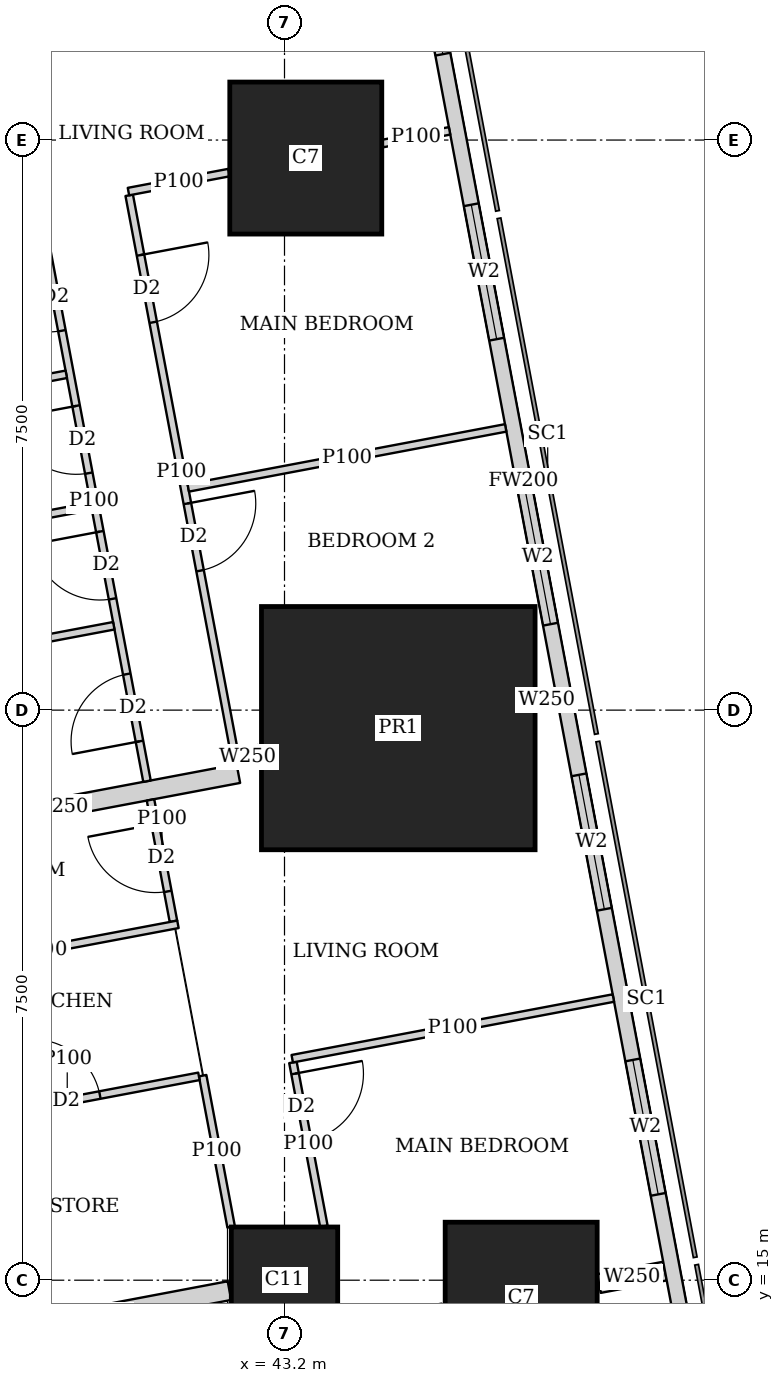
"""IFC4 building model, lengths in metres.
Left out: names, types, materials, properties, quantities, classifications, styles, units other than length and angle.
Written with IfcOpenShell. Run it as: python <this file> out.ifc"""

import sys

from ifc_helpers import new_model, si_unit, direction, frame, frame_2d, origin, origin_2d, place, context, subcontext, project, spatial, rectangle, extrude, element, fill, save


model = new_model("IFC4")
c1 = context("Model", 3, precision=1e-05, world=origin(), true_north=direction((0.0, 1.0)))
c2 = subcontext(c1, "Body", "Model", "MODEL_VIEW")
j1 = project(units=[si_unit("LENGTHUNIT", "METRE"), si_unit("PLANEANGLEUNIT", "RADIAN")], contexts=[c1])
p1 = place(None, origin())
s1 = spatial("IfcSite", under=j1, at=p1, CompositionType="ELEMENT")
p2 = place(p1, origin())
s2 = spatial("IfcBuilding", under=s1, at=p2, CompositionType="ELEMENT")
p3 = place(p2, frame((0.0, 0.0, 259.1)))
s3 = spatial("IfcBuildingStorey", under=s2, at=p3, CompositionType="ELEMENT", Elevation=259.1)
p4 = place(p3, frame((43.2, 15.0, 0.0), z_axis=(0.0, 0.0, 1.0), x_axis=(1.0, 0.0, 0.0)))
e1 = element("IfcColumn", 1, at=p4, inside=s3, PredefinedType="COLUMN", context=c2, shape_type="SweptSolid", body=[
    extrude(rectangle(XDim=1.4, YDim=1.4, at=origin_2d()), origin(), (0.0, 0.0, 1.0), 3.75),
])
p5 = place(p3, frame((46.314, 14.763, 0.0), z_axis=(0.0, 0.0, 1.0), x_axis=(1.0, 0.0, 0.0)))
e2 = element("IfcColumn", 2, at=p5, inside=s3, PredefinedType="COLUMN", context=c2, shape_type="SweptSolid", body=[
    extrude(rectangle(XDim=2.0, YDim=2.0, at=origin_2d()), origin(), (0.0, 0.0, 1.0), 3.75),
])
p6 = place(p3, frame((44.697, 22.263, 0.0), z_axis=(0.0, 0.0, 1.0), x_axis=(1.0, 0.0, 0.0)))
e3 = element("IfcColumn", 3, at=p6, inside=s3, PredefinedType="COLUMN", context=c2, shape_type="SweptSolid", body=[
    extrude(rectangle(XDim=3.6, YDim=3.2, at=origin_2d()), origin(), (0.0, 0.0, 1.0), 3.75),
])
p7 = place(p3, frame((43.48, 29.763, 0.0), z_axis=(0.0, 0.0, 1.0), x_axis=(1.0, 0.0, 0.0)))
e4 = element("IfcColumn", 4, at=p7, inside=s3, PredefinedType="COLUMN", context=c2, shape_type="SweptSolid", body=[
    extrude(rectangle(XDim=2.0, YDim=2.0, at=origin_2d()), origin(), (0.0, 0.0, 1.0), 3.75),
])
p8 = place(p3, frame((49.684, 7.832, 0.0), z_axis=(0.0, 0.0, 1.0), x_axis=(-0.185616669694, 0.982622232565, 0.0)))
e5 = element("IfcWall", 5, at=p8, inside=s3, PredefinedType="SOLIDWALL", context=c2, shape_type="SweptSolid", body=[
    extrude(rectangle(XDim=36.0, YDim=0.2, at=frame_2d((18.0, 0.0))), origin(), (0.0, 0.0, 1.0), 3.5),
])
p9 = place(p8, frame((2.518, 0.0, 0.9)))
e6 = element("IfcOpeningElement", 6, at=p9, cuts=e5, PredefinedType="OPENING", context=c2, shape_type="SweptSolid", body=[
    extrude(rectangle(XDim=2.4, YDim=1.5, at=frame_2d((1.2, 0.75))), frame((0.0, 0.11, 0.0), z_axis=(0.0, -1.0, 0.0), x_axis=(1.0, 0.0, 0.0)), (0.0, 0.0, 1.0), 0.22),
])
p10 = place(p8, frame((8.444, 0.0, 0.9)))
e7 = element("IfcOpeningElement", 7, at=p10, cuts=e5, PredefinedType="OPENING", context=c2, shape_type="SweptSolid", body=[
    extrude(rectangle(XDim=1.8, YDim=1.5, at=frame_2d((0.9, 0.75))), frame((0.0, 0.11, 0.0), z_axis=(0.0, -1.0, 0.0), x_axis=(1.0, 0.0, 0.0)), (0.0, 0.0, 1.0), 0.22),
])
p11 = place(p8, frame((12.261, 0.0, 0.9)))
e8 = element("IfcOpeningElement", 8, at=p11, cuts=e5, PredefinedType="OPENING", context=c2, shape_type="SweptSolid", body=[
    extrude(rectangle(XDim=1.8, YDim=1.5, at=frame_2d((0.9, 0.75))), frame((0.0, 0.11, 0.0), z_axis=(0.0, -1.0, 0.0), x_axis=(1.0, 0.0, 0.0)), (0.0, 0.0, 1.0), 0.22),
])
p12 = place(p8, frame((16.078, 0.0, 0.9)))
e9 = element("IfcOpeningElement", 9, at=p12, cuts=e5, PredefinedType="OPENING", context=c2, shape_type="SweptSolid", body=[
    extrude(rectangle(XDim=1.8, YDim=1.5, at=frame_2d((0.9, 0.75))), frame((0.0, 0.11, 0.0), z_axis=(0.0, -1.0, 0.0), x_axis=(1.0, 0.0, 0.0)), (0.0, 0.0, 1.0), 0.22),
])
p13 = place(p8, frame((19.894, 0.0, 0.9)))
e10 = element("IfcOpeningElement", 10, at=p13, cuts=e5, PredefinedType="OPENING", context=c2, shape_type="SweptSolid", body=[
    extrude(rectangle(XDim=1.8, YDim=1.5, at=frame_2d((0.9, 0.75))), frame((0.0, 0.11, 0.0), z_axis=(0.0, -1.0, 0.0), x_axis=(1.0, 0.0, 0.0)), (0.0, 0.0, 1.0), 0.22),
])
p14 = place(p8, frame((23.71, 0.0, 0.9)))
e11 = element("IfcOpeningElement", 11, at=p14, cuts=e5, PredefinedType="OPENING", context=c2, shape_type="SweptSolid", body=[
    extrude(rectangle(XDim=1.8, YDim=1.5, at=frame_2d((0.9, 0.75))), frame((0.0, 0.11, 0.0), z_axis=(0.0, -1.0, 0.0), x_axis=(1.0, 0.0, 0.0)), (0.0, 0.0, 1.0), 0.22),
])
p15 = place(p8, frame((27.526, 0.0, 0.9)))
e12 = element("IfcOpeningElement", 12, at=p15, cuts=e5, PredefinedType="OPENING", context=c2, shape_type="SweptSolid", body=[
    extrude(rectangle(XDim=1.8, YDim=1.5, at=frame_2d((0.9, 0.75))), frame((0.0, 0.11, 0.0), z_axis=(0.0, -1.0, 0.0), x_axis=(1.0, 0.0, 0.0)), (0.0, 0.0, 1.0), 0.22),
])
p16 = place(p8, frame((32.046, 0.0, 0.9)))
e13 = element("IfcOpeningElement", 13, at=p16, cuts=e5, PredefinedType="OPENING", context=c2, shape_type="SweptSolid", body=[
    extrude(rectangle(XDim=1.8, YDim=1.5, at=frame_2d((0.9, 0.75))), frame((0.0, 0.11, 0.0), z_axis=(0.0, -1.0, 0.0), x_axis=(1.0, 0.0, 0.0)), (0.0, 0.0, 1.0), 0.22),
])
p17 = place(p3, frame((33.781, 42.186, 0.0), z_axis=(0.0, 0.0, 1.0), x_axis=(0.185593518645, -0.9826266055, 0.0)))
e14 = element("IfcWall", 14, at=p17, inside=s3, PredefinedType="SOLIDWALL", context=c2, shape_type="SweptSolid", body=[
    extrude(rectangle(XDim=35.961, YDim=0.15, at=frame_2d((17.98, 0.0))), origin(), (0.0, 0.0, 1.0), 2.5),
])
p18 = place(p17, frame((7.183, 0.0, 0.0)))
e15 = element("IfcOpeningElement", 15, at=p18, cuts=e14, PredefinedType="OPENING", context=c2, shape_type="SweptSolid", body=[
    extrude(rectangle(XDim=1.0, YDim=2.1, at=frame_2d((0.5, 1.05))), frame((0.0, 0.085, 0.0), z_axis=(0.0, -1.0, 0.0), x_axis=(1.0, 0.0, 0.0)), (0.0, 0.0, 1.0), 0.17),
])
p19 = place(p17, frame((11.76, 0.0, 0.0)))
e16 = element("IfcOpeningElement", 16, at=p19, cuts=e14, PredefinedType="OPENING", context=c2, shape_type="SweptSolid", body=[
    extrude(rectangle(XDim=1.0, YDim=2.1, at=frame_2d((0.5, 1.05))), frame((0.0, 0.085, 0.0), z_axis=(0.0, -1.0, 0.0), x_axis=(1.0, 0.0, 0.0)), (0.0, 0.0, 1.0), 0.17),
])
p20 = place(p17, frame((23.863, 0.0, 0.0)))
e17 = element("IfcOpeningElement", 17, at=p20, cuts=e14, PredefinedType="OPENING", context=c2, shape_type="SweptSolid", body=[
    extrude(rectangle(XDim=1.0, YDim=2.1, at=frame_2d((0.5, 1.05))), frame((0.0, 0.085, 0.0), z_axis=(0.0, -1.0, 0.0), x_axis=(1.0, 0.0, 0.0)), (0.0, 0.0, 1.0), 0.17),
])
p21 = place(p17, frame((30.502, 0.0, 0.0)))
e18 = element("IfcOpeningElement", 18, at=p21, cuts=e14, PredefinedType="OPENING", context=c2, shape_type="SweptSolid", body=[
    extrude(rectangle(XDim=1.0, YDim=2.1, at=frame_2d((0.5, 1.05))), frame((0.0, 0.085, 0.0), z_axis=(0.0, -1.0, 0.0), x_axis=(1.0, 0.0, 0.0)), (0.0, 0.0, 1.0), 0.17),
])
p22 = place(p3, frame((41.157, 29.273, 0.0), z_axis=(0.0, 0.0, 1.0), x_axis=(0.18542464283, -0.982658486877, 0.0)))
e19 = element("IfcWall", 19, at=p22, inside=s3, PredefinedType="PARTITIONING", context=c2, shape_type="SweptSolid", body=[
    extrude(rectangle(XDim=7.421, YDim=0.1, at=frame_2d((3.71, 0.0))), origin(), (0.0, 0.0, 1.0), 2.5),
])
p23 = place(p22, frame((0.8, 0.0, 0.0)))
e20 = element("IfcOpeningElement", 20, at=p23, cuts=e19, PredefinedType="OPENING", context=c2, shape_type="SweptSolid", body=[
    extrude(rectangle(XDim=0.9, YDim=2.1, at=frame_2d((0.45, 1.05))), frame((0.0, 0.06, 0.0), z_axis=(0.0, -1.0, 0.0), x_axis=(1.0, 0.0, 0.0)), (0.0, 0.0, 1.0), 0.12),
])
p24 = place(p22, frame((4.126, 0.0, 0.0)))
e21 = element("IfcOpeningElement", 21, at=p24, cuts=e19, PredefinedType="OPENING", context=c2, shape_type="SweptSolid", body=[
    extrude(rectangle(XDim=0.9, YDim=2.1, at=frame_2d((0.45, 1.05))), frame((0.0, 0.06, 0.0), z_axis=(0.0, -1.0, 0.0), x_axis=(1.0, 0.0, 0.0)), (0.0, 0.0, 1.0), 0.12),
])
p25 = place(p3, frame((39.997, 28.942, 0.0), z_axis=(0.0, 0.0, 1.0), x_axis=(0.185686318797, -0.982609073341, 0.0)))
e22 = element("IfcWall", 22, at=p25, inside=s3, PredefinedType="PARTITIONING", context=c2, shape_type="SweptSolid", body=[
    extrude(rectangle(XDim=7.508, YDim=0.1, at=frame_2d((3.754, 0.0))), origin(), (0.0, 0.0, 1.0), 2.5),
])
p26 = place(p25, frame((0.576, 0.0, 0.0)))
e23 = element("IfcOpeningElement", 23, at=p26, cuts=e22, PredefinedType="OPENING", context=c2, shape_type="SweptSolid", body=[
    extrude(rectangle(XDim=0.9, YDim=2.1, at=frame_2d((0.45, 1.05))), frame((0.0, 0.06, 0.0), z_axis=(0.0, -1.0, 0.0), x_axis=(1.0, 0.0, 0.0)), (0.0, 0.0, 1.0), 0.12),
])
p27 = place(p25, frame((4.166, 0.0, 0.0)))
e24 = element("IfcOpeningElement", 24, at=p27, cuts=e22, PredefinedType="OPENING", context=c2, shape_type="SweptSolid", body=[
    extrude(rectangle(XDim=0.9, YDim=2.1, at=frame_2d((0.45, 1.05))), frame((0.0, 0.06, 0.0), z_axis=(0.0, -1.0, 0.0), x_axis=(1.0, 0.0, 0.0)), (0.0, 0.0, 1.0), 0.12),
])
p28 = place(p25, frame((2.483, 0.0, 0.0)))
e25 = element("IfcOpeningElement", 25, at=p28, cuts=e22, PredefinedType="OPENING", context=c2, shape_type="SweptSolid", body=[
    extrude(rectangle(XDim=0.9, YDim=2.1, at=frame_2d((0.45, 1.05))), frame((0.0, 0.06, 0.0), z_axis=(0.0, -1.0, 0.0), x_axis=(1.0, 0.0, 0.0)), (0.0, 0.0, 1.0), 0.12),
])
p29 = place(p25, frame((6.074, 0.0, 0.0)))
e26 = element("IfcOpeningElement", 26, at=p29, cuts=e22, PredefinedType="OPENING", context=c2, shape_type="SweptSolid", body=[
    extrude(rectangle(XDim=0.9, YDim=2.1, at=frame_2d((0.45, 1.05))), frame((0.0, 0.06, 0.0), z_axis=(0.0, -1.0, 0.0), x_axis=(1.0, 0.0, 0.0)), (0.0, 0.0, 1.0), 0.12),
])
p30 = place(p3, frame((45.372, 30.121, 0.0), z_axis=(0.0, 0.0, 1.0), x_axis=(-0.982547416156, -0.186012297994, 0.0)))
e27 = element("IfcWall", 27, at=p30, inside=s3, PredefinedType="PARTITIONING", context=c2, shape_type="SweptSolid", body=[
    extrude(rectangle(XDim=0.898, YDim=0.1, at=frame_2d((0.449, 0.0))), origin(), (0.0, 0.0, 1.0), 3.5),
])
p31 = place(p3, frame((42.47, 29.572, 0.0), z_axis=(0.0, 0.0, 1.0), x_axis=(-0.982610503289, -0.185678751683, 0.0)))
e28 = element("IfcWall", 28, at=p31, inside=s3, PredefinedType="PARTITIONING", context=c2, shape_type="SweptSolid", body=[
    extrude(rectangle(XDim=1.346, YDim=0.1, at=frame_2d((0.673, 0.0))), origin(), (0.0, 0.0, 1.0), 2.5),
])
p32 = place(p3, frame((46.11, 26.213, 0.0), z_axis=(0.0, 0.0, 1.0), x_axis=(-0.982623519589, -0.185609856287, 0.0)))
e29 = element("IfcWall", 29, at=p32, inside=s3, PredefinedType="PARTITIONING", context=c2, shape_type="SweptSolid", body=[
    extrude(rectangle(XDim=4.25, YDim=0.1, at=frame_2d((2.125, 0.0))), origin(), (0.0, 0.0, 1.0), 2.5),
])
p33 = place(p3, frame((40.656, 25.183, 0.0), z_axis=(0.0, 0.0, 1.0), x_axis=(-0.982576058723, -0.185860939478, 0.0)))
e30 = element("IfcWall", 30, at=p33, inside=s3, PredefinedType="PARTITIONING", context=c2, shape_type="SweptSolid", body=[
    extrude(rectangle(XDim=3.524, YDim=0.1, at=frame_2d((1.762, 0.0))), origin(), (0.0, 0.0, 1.0), 3.5),
])
p34 = place(p3, frame((40.329, 26.918, 0.0), z_axis=(0.0, 0.0, 1.0), x_axis=(-0.982638553676, -0.185530247748, 0.0)))
e31 = element("IfcWall", 31, at=p34, inside=s3, PredefinedType="PARTITIONING", context=c2, shape_type="SweptSolid", body=[
    extrude(rectangle(XDim=3.525, YDim=0.1, at=frame_2d((1.763, 0.0))), origin(), (0.0, 0.0, 1.0), 3.5),
])
p35 = place(p3, frame((40.954, 23.61, 0.0), z_axis=(0.0, 0.0, 1.0), x_axis=(-0.98264808502, -0.18547975902, 0.0)))
e32 = element("IfcWall", 32, at=p35, inside=s3, PredefinedType="PARTITIONING", context=c2, shape_type="SweptSolid", body=[
    extrude(rectangle(XDim=3.526, YDim=0.1, at=frame_2d((1.763, 0.0))), origin(), (0.0, 0.0, 1.0), 2.5),
])
p36 = place(p3, frame((41.437, 21.319, 0.0), z_axis=(0.0, 0.0, 1.0), x_axis=(0.185793689589, -0.982588777113, 0.0)))
e33 = element("IfcWall", 33, at=p36, inside=s3, PredefinedType="PARTITIONING", context=c2, shape_type="SweptSolid", body=[
    extrude(rectangle(XDim=1.625, YDim=0.1, at=frame_2d((0.813, 0.0))), origin(), (0.0, 0.0, 1.0), 3.5),
])
p37 = place(p36, frame((0.325, 0.0, 0.0)))
e34 = element("IfcOpeningElement", 34, at=p37, cuts=e33, PredefinedType="OPENING", context=c2, shape_type="SweptSolid", body=[
    extrude(rectangle(XDim=0.9, YDim=2.1, at=frame_2d((0.45, 1.05))), frame((0.0, 0.06, 0.0), z_axis=(0.0, -1.0, 0.0), x_axis=(1.0, 0.0, 0.0)), (0.0, 0.0, 1.0), 0.12),
])
p38 = place(p3, frame((41.798, 19.682, 0.0), z_axis=(0.0, 0.0, 1.0), x_axis=(-0.982681091817, -0.185304807776, 0.0)))
e35 = element("IfcWall", 35, at=p38, inside=s3, PredefinedType="PARTITIONING", context=c2, shape_type="SweptSolid", body=[
    extrude(rectangle(XDim=3.626, YDim=0.1, at=frame_2d((1.813, 0.0))), origin(), (0.0, 0.0, 1.0), 3.5),
])
p39 = place(p3, frame((43.311, 17.865, 0.0), z_axis=(0.0, 0.0, 1.0), x_axis=(0.185572140257, -0.982630643101, 0.0)))
e36 = element("IfcWall", 36, at=p39, inside=s3, PredefinedType="PARTITIONING", context=c2, shape_type="SweptSolid", body=[
    extrude(rectangle(XDim=2.193, YDim=0.1, at=frame_2d((1.097, 0.0))), origin(), (0.0, 0.0, 1.0), 3.5),
])
p40 = place(p39, frame((0.15, 0.0, 0.0)))
e37 = element("IfcOpeningElement", 37, at=p40, cuts=e36, PredefinedType="OPENING", context=c2, shape_type="SweptSolid", body=[
    extrude(rectangle(XDim=0.9, YDim=2.1, at=frame_2d((0.45, 1.05))), frame((0.0, 0.06, 0.0), z_axis=(0.0, -1.0, 0.0), x_axis=(1.0, 0.0, 0.0)), (0.0, 0.0, 1.0), 0.12),
])
p41 = place(p3, frame((42.123, 17.691, 0.0), z_axis=(0.0, 0.0, 1.0), x_axis=(0.185183804812, -0.98270390171, 0.0)))
e38 = element("IfcWall", 38, at=p41, inside=s3, PredefinedType="PARTITIONING", context=c2, shape_type="SweptSolid", body=[
    extrude(rectangle(XDim=2.025, YDim=0.1, at=frame_2d((1.012, 0.0))), origin(), (0.0, 0.0, 1.0), 3.5),
])
p42 = place(p3, frame((47.527, 18.712, 0.0), z_axis=(0.0, 0.0, 1.0), x_axis=(-0.982633535512, -0.185556823879, 0.0)))
e39 = element("IfcWall", 39, at=p42, inside=s3, PredefinedType="PARTITIONING", context=c2, shape_type="SweptSolid", body=[
    extrude(rectangle(XDim=4.3, YDim=0.1, at=frame_2d((2.15, 0.0))), origin(), (0.0, 0.0, 1.0), 2.5),
])
p43 = place(p3, frame((42.074, 17.682, 0.0), z_axis=(0.0, 0.0, 1.0), x_axis=(-0.982660701716, -0.185412904897, 0.0)))
e40 = element("IfcWall", 40, at=p43, inside=s3, PredefinedType="PARTITIONING", context=c2, shape_type="SweptSolid", body=[
    extrude(rectangle(XDim=3.526, YDim=0.1, at=frame_2d((1.763, 0.0))), origin(), (0.0, 0.0, 1.0), 3.5),
])
p44 = place(p43, frame((1.326, 0.0, 0.0)))
e41 = element("IfcOpeningElement", 41, at=p44, cuts=e40, PredefinedType="OPENING", context=c2, shape_type="SweptSolid", body=[
    extrude(rectangle(XDim=0.9, YDim=2.1, at=frame_2d((0.45, 1.05))), frame((0.0, 0.06, 0.0), z_axis=(0.0, -1.0, 0.0), x_axis=(1.0, 0.0, 0.0)), (0.0, 0.0, 1.0), 0.12),
])
p45 = place(p3, frame((46.782, 22.657, 0.0), z_axis=(0.0, 0.0, 1.0), x_axis=(-0.982104607121, -0.188336243648, 0.0)))
e42 = element("IfcWall", 42, at=p45, inside=s3, PredefinedType="SOLIDWALL", context=c2, shape_type="SweptSolid", body=[
    extrude(rectangle(XDim=0.266, YDim=0.25, at=frame_2d((0.133, 0.0))), origin(), (0.0, 0.0, 1.0), 3.5),
])
p46 = place(p3, frame((42.873, 21.918, 0.0), z_axis=(0.0, 0.0, 1.0), x_axis=(-0.982431406936, -0.186624035603, 0.0)))
e43 = element("IfcWall", 43, at=p46, inside=s3, PredefinedType="SOLIDWALL", context=c2, shape_type="SweptSolid", body=[
    extrude(rectangle(XDim=0.322, YDim=0.25, at=frame_2d((0.161, 0.0))), origin(), (0.0, 0.0, 1.0), 2.5),
])
p47 = place(p3, frame((42.593, 21.665, 0.0), z_axis=(0.0, 0.0, 1.0), x_axis=(-0.982635807605, -0.185544791394, 0.0)))
e44 = element("IfcWall", 44, at=p47, inside=s3, PredefinedType="SOLIDWALL", context=c2, shape_type="SweptSolid", body=[
    extrude(rectangle(XDim=4.775, YDim=0.25, at=frame_2d((2.388, 0.0))), origin(), (0.0, 0.0, 1.0), 2.5),
])
p48 = place(p3, frame((48.206, 15.12, 0.0), z_axis=(0.0, 0.0, 1.0), x_axis=(-0.982608419258, -0.185689780017, 0.0)))
e45 = element("IfcWall", 45, at=p48, inside=s3, PredefinedType="SOLIDWALL", context=c2, shape_type="SweptSolid", body=[
    extrude(rectangle(XDim=0.884, YDim=0.25, at=frame_2d((0.442, 0.0))), origin(), (0.0, 0.0, 1.0), 3.5),
])
p49 = place(p3, frame((42.476, 14.863, 0.0), z_axis=(0.0, 0.0, 1.0), x_axis=(-0.982603567712, -0.185715450942, 0.0)))
e46 = element("IfcWall", 46, at=p49, inside=s3, PredefinedType="SOLIDWALL", context=c2, shape_type="SweptSolid", body=[
    extrude(rectangle(XDim=3.398, YDim=0.25, at=frame_2d((1.699, 0.0))), origin(), (0.0, 0.0, 1.0), 3.5),
])
p50 = place(p10, origin())
e47 = element("IfcWindow", 47, at=p50, inside=s3, PartitioningType="SINGLE_PANEL", PredefinedType="WINDOW", context=c2, shape_type="SweptSolid", body=[
    extrude(rectangle(XDim=1.8, YDim=1.5, at=frame_2d((0.9, 0.75))), frame((0.0, 0.03, 0.0), z_axis=(0.0, -1.0, 0.0), x_axis=(1.0, 0.0, 0.0)), (0.0, 0.0, 1.0), 0.06),
])
fill(e7, e47)
p51 = place(p11, origin())
e48 = element("IfcWindow", 48, at=p51, inside=s3, PartitioningType="SINGLE_PANEL", PredefinedType="WINDOW", context=c2, shape_type="SweptSolid", body=[
    extrude(rectangle(XDim=1.8, YDim=1.5, at=frame_2d((0.9, 0.75))), frame((0.0, 0.03, 0.0), z_axis=(0.0, -1.0, 0.0), x_axis=(1.0, 0.0, 0.0)), (0.0, 0.0, 1.0), 0.06),
])
fill(e8, e48)
p52 = place(p12, origin())
e49 = element("IfcWindow", 49, at=p52, inside=s3, PartitioningType="SINGLE_PANEL", PredefinedType="WINDOW", context=c2, shape_type="SweptSolid", body=[
    extrude(rectangle(XDim=1.8, YDim=1.5, at=frame_2d((0.9, 0.75))), frame((0.0, 0.03, 0.0), z_axis=(0.0, -1.0, 0.0), x_axis=(1.0, 0.0, 0.0)), (0.0, 0.0, 1.0), 0.06),
])
fill(e9, e49)
p53 = place(p13, origin())
e50 = element("IfcWindow", 50, at=p53, inside=s3, PartitioningType="SINGLE_PANEL", PredefinedType="WINDOW", context=c2, shape_type="SweptSolid", body=[
    extrude(rectangle(XDim=1.8, YDim=1.5, at=frame_2d((0.9, 0.75))), frame((0.0, 0.03, 0.0), z_axis=(0.0, -1.0, 0.0), x_axis=(1.0, 0.0, 0.0)), (0.0, 0.0, 1.0), 0.06),
])
fill(e10, e50)
p54 = place(p14, origin())
e51 = element("IfcWindow", 51, at=p54, inside=s3, PartitioningType="SINGLE_PANEL", PredefinedType="WINDOW", context=c2, shape_type="SweptSolid", body=[
    extrude(rectangle(XDim=1.8, YDim=1.5, at=frame_2d((0.9, 0.75))), frame((0.0, 0.03, 0.0), z_axis=(0.0, -1.0, 0.0), x_axis=(1.0, 0.0, 0.0)), (0.0, 0.0, 1.0), 0.06),
])
fill(e11, e51)
p55 = place(p23, origin())
e52 = element("IfcDoor", 52, at=p55, inside=s3, OperationType="SINGLE_SWING_LEFT", PredefinedType="DOOR", context=c2, shape_type="SweptSolid", body=[
    extrude(rectangle(XDim=0.9, YDim=2.1, at=frame_2d((0.45, 1.05))), frame((0.0, 0.025, 0.0), z_axis=(0.0, -1.0, 0.0), x_axis=(1.0, 0.0, 0.0)), (0.0, 0.0, 1.0), 0.05),
])
fill(e20, e52)
p56 = place(p24, origin())
e53 = element("IfcDoor", 53, at=p56, inside=s3, OperationType="SINGLE_SWING_LEFT", PredefinedType="DOOR", context=c2, shape_type="SweptSolid", body=[
    extrude(rectangle(XDim=0.9, YDim=2.1, at=frame_2d((0.45, 1.05))), frame((0.0, 0.025, 0.0), z_axis=(0.0, -1.0, 0.0), x_axis=(1.0, 0.0, 0.0)), (0.0, 0.0, 1.0), 0.05),
])
fill(e21, e53)
p57 = place(p26, origin())
e54 = element("IfcDoor", 54, at=p57, inside=s3, OperationType="SINGLE_SWING_RIGHT", PredefinedType="DOOR", context=c2, shape_type="SweptSolid", body=[
    extrude(rectangle(XDim=0.9, YDim=2.1, at=frame_2d((0.45, 1.05))), frame((0.0, 0.025, 0.0), z_axis=(0.0, -1.0, 0.0), x_axis=(1.0, 0.0, 0.0)), (0.0, 0.0, 1.0), 0.05),
])
fill(e23, e54)
p58 = place(p27, origin())
e55 = element("IfcDoor", 55, at=p58, inside=s3, OperationType="SINGLE_SWING_RIGHT", PredefinedType="DOOR", context=c2, shape_type="SweptSolid", body=[
    extrude(rectangle(XDim=0.9, YDim=2.1, at=frame_2d((0.45, 1.05))), frame((0.0, 0.025, 0.0), z_axis=(0.0, -1.0, 0.0), x_axis=(1.0, 0.0, 0.0)), (0.0, 0.0, 1.0), 0.05),
])
fill(e24, e55)
p59 = place(p28, origin())
e56 = element("IfcDoor", 56, at=p59, inside=s3, OperationType="SINGLE_SWING_RIGHT", PredefinedType="DOOR", context=c2, shape_type="SweptSolid", body=[
    extrude(rectangle(XDim=0.9, YDim=2.1, at=frame_2d((0.45, 1.05))), frame((0.0, 0.025, 0.0), z_axis=(0.0, -1.0, 0.0), x_axis=(1.0, 0.0, 0.0)), (0.0, 0.0, 1.0), 0.05),
])
fill(e25, e56)
p60 = place(p29, origin())
e57 = element("IfcDoor", 57, at=p60, inside=s3, OperationType="SINGLE_SWING_LEFT", PredefinedType="DOOR", context=c2, shape_type="SweptSolid", body=[
    extrude(rectangle(XDim=0.9, YDim=2.1, at=frame_2d((0.45, 1.05))), frame((0.0, 0.025, 0.0), z_axis=(0.0, -1.0, 0.0), x_axis=(1.0, 0.0, 0.0)), (0.0, 0.0, 1.0), 0.05),
])
fill(e26, e57)
p61 = place(p37, origin())
e58 = element("IfcDoor", 58, at=p61, inside=s3, OperationType="SINGLE_SWING_RIGHT", PredefinedType="DOOR", context=c2, shape_type="SweptSolid", body=[
    extrude(rectangle(XDim=0.9, YDim=2.1, at=frame_2d((0.45, 1.05))), frame((0.0, 0.025, 0.0), z_axis=(0.0, -1.0, 0.0), x_axis=(1.0, 0.0, 0.0)), (0.0, 0.0, 1.0), 0.05),
])
fill(e34, e58)
p62 = place(p40, origin())
e59 = element("IfcDoor", 59, at=p62, inside=s3, OperationType="SINGLE_SWING_LEFT", PredefinedType="DOOR", context=c2, shape_type="SweptSolid", body=[
    extrude(rectangle(XDim=0.9, YDim=2.1, at=frame_2d((0.45, 1.05))), frame((0.0, 0.025, 0.0), z_axis=(0.0, -1.0, 0.0), x_axis=(1.0, 0.0, 0.0)), (0.0, 0.0, 1.0), 0.05),
])
fill(e37, e59)
p63 = place(p44, origin())
e60 = element("IfcDoor", 60, at=p63, inside=s3, OperationType="SINGLE_SWING_LEFT", PredefinedType="DOOR", context=c2, shape_type="SweptSolid", body=[
    extrude(rectangle(XDim=0.9, YDim=2.1, at=frame_2d((0.45, 1.05))), frame((0.0, 0.025, 0.0), z_axis=(0.0, -1.0, 0.0), x_axis=(1.0, 0.0, 0.0)), (0.0, 0.0, 1.0), 0.05),
])
fill(e41, e60)
save(model, sys.argv[1])
